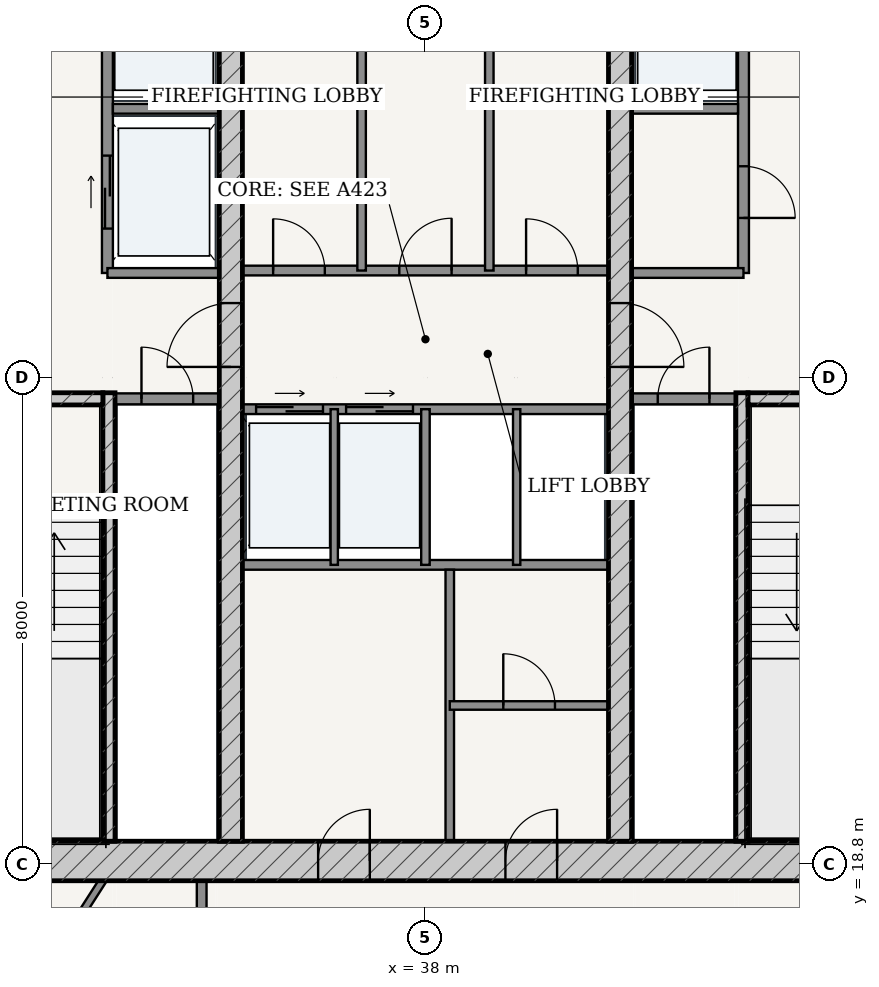
"""IFC4 building model, lengths in metres.
Left out: names, types, materials, properties, quantities, classifications, styles, units other than length and angle.
Written with IfcOpenShell. Run it as: python <this file> out.ifc"""

import sys

from ifc_helpers import new_model, si_unit, direction, frame, frame_2d, origin, place, context, subcontext, project, spatial, rectangle, extrude, source, transform, mapped, element, fill, save


model = new_model("IFC4")
c1 = context("Model", 3, precision=1e-05, world=origin(), true_north=direction((-0.2419218956, 0.970295726276)))
c2 = subcontext(c1, "Body", "Model", "MODEL_VIEW")
j1 = project(units=[si_unit("LENGTHUNIT", "METRE"), si_unit("PLANEANGLEUNIT", "RADIAN")], contexts=[c1])
p1 = place(None, origin())
s1 = spatial("IfcSite", under=j1, at=p1, CompositionType="ELEMENT")
p2 = place(p1, origin())
s2 = spatial("IfcBuilding", under=s1, at=p2, CompositionType="ELEMENT")
p3 = place(p2, frame((0.0, 0.0, 149.8)))
s3 = spatial("IfcBuildingStorey", under=s2, at=p3, CompositionType="ELEMENT", Elevation=149.8)
p4 = place(p3, frame((28.725, 18.85, 0.0), z_axis=(0.0, 0.0, 1.0), x_axis=(1.0, 0.0, 0.0)))
e1 = element("IfcWall", 1, at=p4, inside=s3, PredefinedType="SHEAR", context=c2, shape_type="SweptSolid", body=[
    extrude(rectangle(XDim=18.55, YDim=0.65, at=frame_2d((9.275, 0.0))), origin(), (0.0, 0.0, 1.0), 3.33),
])
p5 = place(p4, frame((7.51, 0.0, 0.0)))
e2 = element("IfcOpeningElement", 2, at=p5, cuts=e1, PredefinedType="OPENING", context=c2, shape_type="SweptSolid", body=[
    extrude(rectangle(XDim=0.85, YDim=2.1, at=frame_2d((0.425, 1.05))), frame((0.0, 0.335, 0.0), z_axis=(0.0, -1.0, 0.0), x_axis=(1.0, 0.0, 0.0)), (0.0, 0.0, 1.0), 0.67),
])
p6 = place(p4, frame((10.59, 0.0, 0.0)))
e3 = element("IfcOpeningElement", 3, at=p6, cuts=e1, PredefinedType="OPENING", context=c2, shape_type="SweptSolid", body=[
    extrude(rectangle(XDim=0.85, YDim=2.1, at=frame_2d((0.425, 1.05))), frame((0.0, 0.335, 0.0), z_axis=(0.0, -1.0, 0.0), x_axis=(1.0, 0.0, 0.0)), (0.0, 0.0, 1.0), 0.67),
])
p7 = place(p3, frame((32.795, 19.175, 0.0), z_axis=(0.0, 0.0, 1.0), x_axis=(0.0, 1.0, 0.0)))
e4 = element("IfcWall", 4, at=p7, inside=s3, PredefinedType="SOLIDWALL", context=c2, shape_type="SweptSolid", body=[
    extrude(rectangle(XDim=7.375, YDim=0.2, at=frame_2d((3.688, 0.0))), origin(), (0.0, 0.0, 1.0), 3.33),
])
p8 = place(p3, frame((29.375, 26.45, 0.0), z_axis=(0.0, 0.0, 1.0), x_axis=(1.0, 0.0, 0.0)))
e5 = element("IfcWall", 5, at=p8, inside=s3, PredefinedType="SOLIDWALL", context=c2, shape_type="SweptSolid", body=[
    extrude(rectangle(XDim=3.32, YDim=0.2, at=frame_2d((1.66, 0.0))), origin(), (0.0, 0.0, 1.0), 3.33),
])
p9 = place(p8, frame((1.185, 0.0, 0.0)))
e6 = element("IfcOpeningElement", 6, at=p9, cuts=e5, PredefinedType="OPENING", context=c2, shape_type="SweptSolid", body=[
    extrude(rectangle(XDim=0.95, YDim=2.15, at=frame_2d((0.475, 1.075))), frame((0.0, 0.11, 0.0), z_axis=(0.0, -1.0, 0.0), x_axis=(1.0, 0.0, 0.0)), (0.0, 0.0, 1.0), 0.22),
])
p10 = place(p3, frame((43.205, 19.175, 0.0), z_axis=(0.0, 0.0, 1.0), x_axis=(0.0, 1.0, 0.0)))
e7 = element("IfcWall", 7, at=p10, inside=s3, PredefinedType="SOLIDWALL", context=c2, shape_type="SweptSolid", body=[
    extrude(rectangle(XDim=7.375, YDim=0.2, at=frame_2d((3.688, 0.0))), origin(), (0.0, 0.0, 1.0), 3.33),
])
p11 = place(p3, frame((43.305, 26.45, 0.0), z_axis=(0.0, 0.0, 1.0), x_axis=(1.0, 0.0, 0.0)))
e8 = element("IfcWall", 8, at=p11, inside=s3, PredefinedType="SOLIDWALL", context=c2, shape_type="SweptSolid", body=[
    extrude(rectangle(XDim=3.32, YDim=0.2, at=frame_2d((1.66, 0.0))), origin(), (0.0, 0.0, 1.0), 3.33),
])
p12 = place(p11, frame((1.185, 0.0, 0.0)))
e9 = element("IfcOpeningElement", 9, at=p12, cuts=e8, PredefinedType="OPENING", context=c2, shape_type="SweptSolid", body=[
    extrude(rectangle(XDim=0.95, YDim=2.15, at=frame_2d((0.475, 1.075))), frame((0.0, 0.11, 0.0), z_axis=(0.0, -1.0, 0.0), x_axis=(1.0, 0.0, 0.0)), (0.0, 0.0, 1.0), 0.22),
])
p13 = place(p3, frame((34.8, 19.175, 0.0), z_axis=(0.0, 0.0, 1.0), x_axis=(0.0, 1.0, 0.0)))
e10 = element("IfcWall", 10, at=p13, inside=s3, PredefinedType="SHEAR", context=c2, shape_type="SweptSolid", body=[
    extrude(rectangle(XDim=15.25, YDim=0.38, at=frame_2d((7.625, 0.0))), origin(), (0.0, 0.0, 1.0), 3.33),
])
p14 = place(p13, frame((7.8, 0.0, 0.0)))
e11 = element("IfcOpeningElement", 11, at=p14, cuts=e10, PredefinedType="OPENING", context=c2, shape_type="SweptSolid", body=[
    extrude(rectangle(XDim=1.05, YDim=2.15, at=frame_2d((0.525, 1.075))), frame((0.0, 0.2, 0.0), z_axis=(0.0, -1.0, 0.0), x_axis=(1.0, 0.0, 0.0)), (0.0, 0.0, 1.0), 0.4),
])
p15 = place(p3, frame((41.2, 19.175, 0.0), z_axis=(0.0, 0.0, 1.0), x_axis=(0.0, 1.0, 0.0)))
e12 = element("IfcWall", 12, at=p15, inside=s3, PredefinedType="SHEAR", context=c2, shape_type="SweptSolid", body=[
    extrude(rectangle(XDim=15.25, YDim=0.38, at=frame_2d((7.625, 0.0))), origin(), (0.0, 0.0, 1.0), 3.33),
])
p16 = place(p15, frame((7.8, 0.0, 0.0)))
e13 = element("IfcOpeningElement", 13, at=p16, cuts=e12, PredefinedType="OPENING", context=c2, shape_type="SweptSolid", body=[
    extrude(rectangle(XDim=1.05, YDim=2.15, at=frame_2d((0.525, 1.075))), frame((0.0, 0.2, 0.0), z_axis=(0.0, -1.0, 0.0), x_axis=(1.0, 0.0, 0.0)), (0.0, 0.0, 1.0), 0.4),
])
p17 = place(p3, frame((32.9, 26.45, 0.0), z_axis=(0.0, 0.0, 1.0), x_axis=(1.0, 0.0, 0.0)))
e14 = element("IfcWall", 14, at=p17, inside=s3, PredefinedType="PARTITIONING", context=c2, shape_type="SweptSolid", body=[
    extrude(rectangle(XDim=1.71, YDim=0.18, at=frame_2d((0.855, 0.0))), origin(), (0.0, 0.0, 1.0), 3.33),
])
p18 = place(p17, frame((0.43, 0.0, 0.0)))
e15 = element("IfcOpeningElement", 15, at=p18, cuts=e14, PredefinedType="OPENING", context=c2, shape_type="SweptSolid", body=[
    extrude(rectangle(XDim=0.85, YDim=2.1, at=frame_2d((0.425, 1.05))), frame((0.0, 0.1, 0.0), z_axis=(0.0, -1.0, 0.0), x_axis=(1.0, 0.0, 0.0)), (0.0, 0.0, 1.0), 0.2),
])
p19 = place(p3, frame((41.39, 26.45, 0.0), z_axis=(0.0, 0.0, 1.0), x_axis=(1.0, 0.0, 0.0)))
e16 = element("IfcWall", 16, at=p19, inside=s3, PredefinedType="PARTITIONING", context=c2, shape_type="SweptSolid", body=[
    extrude(rectangle(XDim=1.71, YDim=0.18, at=frame_2d((0.855, 0.0))), origin(), (0.0, 0.0, 1.0), 3.33),
])
p20 = place(p19, frame((0.43, 0.0, 0.0)))
e17 = element("IfcOpeningElement", 17, at=p20, cuts=e16, PredefinedType="OPENING", context=c2, shape_type="SweptSolid", body=[
    extrude(rectangle(XDim=0.85, YDim=2.1, at=frame_2d((0.425, 1.05))), frame((0.0, 0.1, 0.0), z_axis=(0.0, -1.0, 0.0), x_axis=(1.0, 0.0, 0.0)), (0.0, 0.0, 1.0), 0.2),
])
p21 = place(p3, frame((32.77, 28.52, 0.0), z_axis=(0.0, 0.0, 1.0), x_axis=(0.0, 1.0, 0.0)))
e18 = element("IfcWall", 18, at=p21, inside=s3, PredefinedType="PARTITIONING", context=c2, shape_type="SweptSolid", body=[
    extrude(rectangle(XDim=5.905, YDim=0.18, at=frame_2d((2.953, 0.0))), origin(), (0.0, 0.0, 1.0), 3.33),
])
p22 = place(p21, frame((3.655, 0.0, 0.0)))
e19 = element("IfcOpeningElement", 19, at=p22, cuts=e18, PredefinedType="OPENING", context=c2, shape_type="SweptSolid", body=[
    extrude(rectangle(XDim=1.15, YDim=2.2, at=frame_2d((0.575, 1.1))), frame((0.0, 0.1, 0.0), z_axis=(0.0, -1.0, 0.0), x_axis=(1.0, 0.0, 0.0)), (0.0, 0.0, 1.0), 0.2),
])
p23 = place(p21, frame((0.73, 0.0, 0.0)))
e20 = element("IfcOpeningElement", 20, at=p23, cuts=e18, PredefinedType="OPENING", context=c2, shape_type="SweptSolid", body=[
    extrude(rectangle(XDim=1.2, YDim=2.25, at=frame_2d((0.6, 1.125))), frame((0.0, 0.1, 0.0), z_axis=(0.0, -1.0, 0.0), x_axis=(1.0, 0.0, 0.0)), (0.0, 0.0, 1.0), 0.2),
])
p24 = place(p3, frame((32.86, 31.22, 0.0), z_axis=(0.0, 0.0, 1.0), x_axis=(1.0, 0.0, 0.0)))
e21 = element("IfcWall", 21, at=p24, inside=s3, PredefinedType="PARTITIONING", context=c2, shape_type="SweptSolid", body=[
    extrude(rectangle(XDim=1.75, YDim=0.16, at=frame_2d((0.875, 0.0))), origin(), (0.0, 0.0, 1.0), 3.33),
])
p25 = place(p3, frame((32.77, 28.52, 0.0), z_axis=(0.0, 0.0, 1.0), x_axis=(1.0, 0.0, 0.0)))
e22 = element("IfcWall", 22, at=p25, inside=s3, PredefinedType="PARTITIONING", context=c2, shape_type="SweptSolid", body=[
    extrude(rectangle(XDim=1.84, YDim=0.16, at=frame_2d((0.92, 0.0))), origin(), (0.0, 0.0, 1.0), 3.33),
])
p26 = place(p3, frame((43.23, 28.52, 0.0), z_axis=(0.0, 0.0, 1.0), x_axis=(0.0, 1.0, 0.0)))
e23 = element("IfcWall", 23, at=p26, inside=s3, PredefinedType="PARTITIONING", context=c2, shape_type="SweptSolid", body=[
    extrude(rectangle(XDim=5.905, YDim=0.18, at=frame_2d((2.953, 0.0))), origin(), (0.0, 0.0, 1.0), 3.33),
])
p27 = place(p26, frame((0.905, 0.0, 0.0)))
e24 = element("IfcOpeningElement", 24, at=p27, cuts=e23, PredefinedType="OPENING", context=c2, shape_type="SweptSolid", body=[
    extrude(rectangle(XDim=0.85, YDim=2.1, at=frame_2d((0.425, 1.05))), frame((0.0, 0.1, 0.0), z_axis=(0.0, -1.0, 0.0), x_axis=(1.0, 0.0, 0.0)), (0.0, 0.0, 1.0), 0.2),
])
p28 = place(p26, frame((3.655, 0.0, 0.0)))
e25 = element("IfcOpeningElement", 25, at=p28, cuts=e23, PredefinedType="OPENING", context=c2, shape_type="SweptSolid", body=[
    extrude(rectangle(XDim=1.15, YDim=2.2, at=frame_2d((0.575, 1.1))), frame((0.0, 0.1, 0.0), z_axis=(0.0, -1.0, 0.0), x_axis=(1.0, 0.0, 0.0)), (0.0, 0.0, 1.0), 0.2),
])
p29 = place(p3, frame((41.39, 31.22, 0.0), z_axis=(0.0, 0.0, 1.0), x_axis=(1.0, 0.0, 0.0)))
e26 = element("IfcWall", 26, at=p29, inside=s3, PredefinedType="PARTITIONING", context=c2, shape_type="SweptSolid", body=[
    extrude(rectangle(XDim=1.75, YDim=0.16, at=frame_2d((0.875, 0.0))), origin(), (0.0, 0.0, 1.0), 3.33),
])
p30 = place(p3, frame((41.39, 28.52, 0.0), z_axis=(0.0, 0.0, 1.0), x_axis=(1.0, 0.0, 0.0)))
e27 = element("IfcWall", 27, at=p30, inside=s3, PredefinedType="PARTITIONING", context=c2, shape_type="SweptSolid", body=[
    extrude(rectangle(XDim=1.84, YDim=0.16, at=frame_2d((0.92, 0.0))), origin(), (0.0, 0.0, 1.0), 3.33),
])
p31 = place(p3, frame((34.99, 28.56, 0.0), z_axis=(0.0, 0.0, 1.0), x_axis=(1.0, 0.0, 0.0)))
e28 = element("IfcWall", 28, at=p31, inside=s3, PredefinedType="PARTITIONING", context=c2, shape_type="SweptSolid", body=[
    extrude(rectangle(XDim=6.02, YDim=0.16, at=frame_2d((3.01, 0.0))), origin(), (0.0, 0.0, 1.0), 3.33),
])
p32 = place(p31, frame((0.505, 0.0, 0.0)))
e29 = element("IfcOpeningElement", 29, at=p32, cuts=e28, PredefinedType="OPENING", context=c2, shape_type="SweptSolid", body=[
    extrude(rectangle(XDim=0.85, YDim=2.1, at=frame_2d((0.425, 1.05))), frame((0.0, 0.09, 0.0), z_axis=(0.0, -1.0, 0.0), x_axis=(1.0, 0.0, 0.0)), (0.0, 0.0, 1.0), 0.18),
])
p33 = place(p31, frame((2.58, 0.0, 0.0)))
e30 = element("IfcOpeningElement", 30, at=p33, cuts=e28, PredefinedType="OPENING", context=c2, shape_type="SweptSolid", body=[
    extrude(rectangle(XDim=0.86, YDim=2.1, at=frame_2d((0.43, 1.05))), frame((0.0, 0.09, 0.0), z_axis=(0.0, -1.0, 0.0), x_axis=(1.0, 0.0, 0.0)), (0.0, 0.0, 1.0), 0.18),
])
p34 = place(p31, frame((4.665, 0.0, 0.0)))
e31 = element("IfcOpeningElement", 31, at=p34, cuts=e28, PredefinedType="OPENING", context=c2, shape_type="SweptSolid", body=[
    extrude(rectangle(XDim=0.85, YDim=2.1, at=frame_2d((0.425, 1.05))), frame((0.0, 0.09, 0.0), z_axis=(0.0, -1.0, 0.0), x_axis=(1.0, 0.0, 0.0)), (0.0, 0.0, 1.0), 0.18),
])
for number, where, z_axis, x_axis in (
    (32, (36.95, 28.56, 0.0), (0.0, 0.0, 1.0), (0.0, 1.0, 0.0)),
    (33, (39.05, 28.56, 0.0), (0.0, 0.0, 1.0), (0.0, 1.0, 0.0)),
):
    element("IfcWall", number, at=place(p3, frame(where, z_axis=z_axis, x_axis=x_axis)), inside=s3, PredefinedType="PARTITIONING", context=c2, shape_type="SweptSolid", body=[
        extrude(rectangle(XDim=5.865, YDim=0.14, at=frame_2d((2.933, 0.0))), origin(), (0.0, 0.0, 1.0), 3.33),
    ])
p35 = place(p3, frame((34.99, 26.28, 0.0), z_axis=(0.0, 0.0, 1.0), x_axis=(1.0, 0.0, 0.0)))
e34 = element("IfcWall", 34, at=p35, inside=s3, PredefinedType="PARTITIONING", context=c2, shape_type="SweptSolid", body=[
    extrude(rectangle(XDim=6.02, YDim=0.16, at=frame_2d((3.01, 0.0))), origin(), (0.0, 0.0, 1.0), 3.33),
])
p36 = place(p35, frame((0.225, 0.0, 0.0)))
e35 = element("IfcOpeningElement", 35, at=p36, cuts=e34, PredefinedType="OPENING", context=c2, shape_type="SweptSolid", body=[
    extrude(rectangle(XDim=1.1, YDim=2.2, at=frame_2d((0.55, 1.1))), frame((0.0, 0.09, 0.0), z_axis=(0.0, -1.0, 0.0), x_axis=(1.0, 0.0, 0.0)), (0.0, 0.0, 1.0), 0.18),
])
p37 = place(p35, frame((1.705, 0.0, 0.0)))
e36 = element("IfcOpeningElement", 36, at=p37, cuts=e34, PredefinedType="OPENING", context=c2, shape_type="SweptSolid", body=[
    extrude(rectangle(XDim=1.1, YDim=2.2, at=frame_2d((0.55, 1.1))), frame((0.0, 0.09, 0.0), z_axis=(0.0, -1.0, 0.0), x_axis=(1.0, 0.0, 0.0)), (0.0, 0.0, 1.0), 0.18),
])
p38 = place(p3, frame((34.99, 23.72, 0.0), z_axis=(0.0, 0.0, 1.0), x_axis=(1.0, 0.0, 0.0)))
e37 = element("IfcWall", 37, at=p38, inside=s3, PredefinedType="PARTITIONING", context=c2, shape_type="SweptSolid", body=[
    extrude(rectangle(XDim=6.02, YDim=0.16, at=frame_2d((3.01, 0.0))), origin(), (0.0, 0.0, 1.0), 3.33),
])
p39 = place(p3, frame((36.5, 23.72, 0.0), z_axis=(0.0, 0.0, 1.0), x_axis=(0.0, 1.0, 0.0)))
e38 = element("IfcWall", 38, at=p39, inside=s3, PredefinedType="PARTITIONING", context=c2, shape_type="SweptSolid", body=[
    extrude(rectangle(XDim=2.56, YDim=0.12, at=frame_2d((1.28, 0.0))), origin(), (0.0, 0.0, 1.0), 3.33),
])
p40 = place(p3, frame((38.0, 23.72, 0.0), z_axis=(0.0, 0.0, 1.0), x_axis=(0.0, 1.0, 0.0)))
e39 = element("IfcWall", 39, at=p40, inside=s3, PredefinedType="PARTITIONING", context=c2, shape_type="SweptSolid", body=[
    extrude(rectangle(XDim=2.56, YDim=0.14, at=frame_2d((1.28, 0.0))), origin(), (0.0, 0.0, 1.0), 3.33),
])
p41 = place(p3, frame((39.5, 23.72, 0.0), z_axis=(0.0, 0.0, 1.0), x_axis=(0.0, 1.0, 0.0)))
e40 = element("IfcWall", 40, at=p41, inside=s3, PredefinedType="PARTITIONING", context=c2, shape_type="SweptSolid", body=[
    extrude(rectangle(XDim=2.56, YDim=0.12, at=frame_2d((1.28, 0.0))), origin(), (0.0, 0.0, 1.0), 3.33),
])
p42 = place(p3, frame((38.4, 19.175, 0.0), z_axis=(0.0, 0.0, 1.0), x_axis=(0.0, 1.0, 0.0)))
e41 = element("IfcWall", 41, at=p42, inside=s3, PredefinedType="PARTITIONING", context=c2, shape_type="SweptSolid", body=[
    extrude(rectangle(XDim=4.465, YDim=0.14, at=frame_2d((2.232, 0.0))), origin(), (0.0, 0.0, 1.0), 3.33),
])
p43 = place(p3, frame((38.4, 21.407, 0.0), z_axis=(0.0, 0.0, 1.0), x_axis=(1.0, 0.0, 0.0)))
e42 = element("IfcWall", 42, at=p43, inside=s3, PredefinedType="PARTITIONING", context=c2, shape_type="SweptSolid", body=[
    extrude(rectangle(XDim=2.61, YDim=0.14, at=frame_2d((1.305, 0.0))), origin(), (0.0, 0.0, 1.0), 3.33),
])
p44 = place(p43, frame((0.88, 0.0, 0.0)))
e43 = element("IfcOpeningElement", 43, at=p44, cuts=e42, PredefinedType="OPENING", context=c2, shape_type="SweptSolid", body=[
    extrude(rectangle(XDim=0.85, YDim=2.1, at=frame_2d((0.425, 1.05))), frame((0.0, 0.08, 0.0), z_axis=(0.0, -1.0, 0.0), x_axis=(1.0, 0.0, 0.0)), (0.0, 0.0, 1.0), 0.16),
])
p45 = place(p3, frame((34.32, 16.675, 0.0), z_axis=(0.0, 0.0, 1.0), x_axis=(0.0, 1.0, 0.0)))
e44 = element("IfcWall", 44, at=p45, inside=s3, PredefinedType="PARTITIONING", context=c2, shape_type="SweptSolid", body=[
    extrude(rectangle(XDim=1.85, YDim=0.16, at=frame_2d((0.925, 0.0))), origin(), (0.0, 0.0, 1.0), 3.33),
])
p46 = place(p3, frame((32.691, 18.525, 0.0), z_axis=(0.0, 0.0, 1.0), x_axis=(-0.54002976428, -0.841645919429, 0.0)))
e45 = element("IfcWall", 45, at=p46, inside=s3, PredefinedType="PARTITIONING", context=c2, shape_type="SweptSolid", body=[
    extrude(rectangle(XDim=3.086, YDim=0.12, at=frame_2d((1.543, 0.0))), origin(), (0.0, 0.0, 1.0), 3.33),
])
m1 = source(origin(), c2, "Body", "SweptSolid", [
    extrude(rectangle(XDim=1.05, YDim=2.15, at=frame_2d((0.525, 1.075))), frame((0.0, 0.025, 0.0), z_axis=(0.0, -1.0, 0.0), x_axis=(1.0, 0.0, 0.0)), (0.0, 0.0, 1.0), 0.05),
])
p47 = place(p14, origin())
e46 = element("IfcDoor", 46, at=p47, inside=s3, OperationType="SINGLE_SWING_LEFT", PredefinedType="DOOR", context=c2, shape_type="MappedRepresentation", body=[
    mapped(m1, transform((0.0, 0.0, 0.0), scale=1.0)),
])
fill(e11, e46)
p48 = place(p16, frame((1.05, 0.0, 0.0), z_axis=(0.0, 0.0, 1.0), x_axis=(-1.0, 0.0, 0.0)))
e47 = element("IfcDoor", 47, at=p48, inside=s3, OperationType="SINGLE_SWING_RIGHT", PredefinedType="DOOR", context=c2, shape_type="MappedRepresentation", body=[
    mapped(m1, transform((0.0, 0.0, 0.0), scale=1.0)),
])
fill(e13, e47)
m2 = source(origin(), c2, "Body", "SweptSolid", [
    extrude(rectangle(XDim=0.85, YDim=2.1, at=frame_2d((0.425, 1.05))), frame((0.0, 0.025, 0.0), z_axis=(0.0, -1.0, 0.0), x_axis=(1.0, 0.0, 0.0)), (0.0, 0.0, 1.0), 0.05),
])
p49 = place(p18, origin())
e48 = element("IfcDoor", 48, at=p49, inside=s3, OperationType="SINGLE_SWING_LEFT", PredefinedType="DOOR", context=c2, shape_type="MappedRepresentation", body=[
    mapped(m2, transform((0.0, 0.0, 0.0), scale=1.0)),
])
fill(e15, e48)
p50 = place(p20, origin())
e49 = element("IfcDoor", 49, at=p50, inside=s3, OperationType="SINGLE_SWING_RIGHT", PredefinedType="DOOR", context=c2, shape_type="MappedRepresentation", body=[
    mapped(m2, transform((0.0, 0.0, 0.0), scale=1.0)),
])
fill(e17, e49)
p51 = place(p27, frame((0.85, 0.0, 0.0), z_axis=(0.0, 0.0, 1.0), x_axis=(-1.0, 0.0, 0.0)))
e50 = element("IfcDoor", 50, at=p51, inside=s3, OperationType="SINGLE_SWING_RIGHT", PredefinedType="DOOR", context=c2, shape_type="MappedRepresentation", body=[
    mapped(m2, transform((0.0, 0.0, 0.0), scale=1.0)),
])
fill(e24, e50)
p52 = place(p32, origin())
e51 = element("IfcDoor", 51, at=p52, inside=s3, OperationType="SINGLE_SWING_LEFT", PredefinedType="DOOR", context=c2, shape_type="MappedRepresentation", body=[
    mapped(m2, transform((0.0, 0.0, 0.0), scale=1.0)),
])
fill(e29, e51)
m3 = source(origin(), c2, "Body", "SweptSolid", [
    extrude(rectangle(XDim=0.86, YDim=2.1, at=frame_2d((0.43, 1.05))), frame((0.0, 0.025, 0.0), z_axis=(0.0, -1.0, 0.0), x_axis=(1.0, 0.0, 0.0)), (0.0, 0.0, 1.0), 0.05),
])
p53 = place(p33, origin())
e52 = element("IfcDoor", 52, at=p53, inside=s3, OperationType="SINGLE_SWING_RIGHT", PredefinedType="DOOR", context=c2, shape_type="MappedRepresentation", body=[
    mapped(m3, transform((0.0, 0.0, 0.0), scale=1.0)),
])
fill(e30, e52)
p54 = place(p34, origin())
e53 = element("IfcDoor", 53, at=p54, inside=s3, OperationType="SINGLE_SWING_LEFT", PredefinedType="DOOR", context=c2, shape_type="MappedRepresentation", body=[
    mapped(m2, transform((0.0, 0.0, 0.0), scale=1.0)),
])
fill(e31, e53)
p55 = place(p5, origin())
e54 = element("IfcDoor", 54, at=p55, inside=s3, OperationType="SINGLE_SWING_RIGHT", PredefinedType="DOOR", context=c2, shape_type="MappedRepresentation", body=[
    mapped(m2, transform((0.0, 0.0, 0.0), scale=1.0)),
])
fill(e2, e54)
p56 = place(p6, origin())
e55 = element("IfcDoor", 55, at=p56, inside=s3, OperationType="SINGLE_SWING_RIGHT", PredefinedType="DOOR", context=c2, shape_type="MappedRepresentation", body=[
    mapped(m2, transform((0.0, 0.0, 0.0), scale=1.0)),
])
fill(e3, e55)
p57 = place(p44, origin())
e56 = element("IfcDoor", 56, at=p57, inside=s3, OperationType="SINGLE_SWING_LEFT", PredefinedType="DOOR", context=c2, shape_type="MappedRepresentation", body=[
    mapped(m2, transform((0.0, 0.0, 0.0), scale=1.0)),
])
fill(e43, e56)
m4 = source(origin(), c2, "Body", "SweptSolid", [
    extrude(rectangle(XDim=1.2, YDim=2.25, at=frame_2d((0.6, 1.125))), frame((0.0, 0.025, 0.0), z_axis=(0.0, -1.0, 0.0), x_axis=(1.0, 0.0, 0.0)), (0.0, 0.0, 1.0), 0.05),
])
p58 = place(p23, origin())
e57 = element("IfcDoor", 57, at=p58, inside=s3, OperationType="DOUBLE_DOOR_SLIDING", PredefinedType="DOOR", context=c2, shape_type="MappedRepresentation", body=[
    mapped(m4, transform((0.0, 0.0, 0.0), scale=1.0)),
])
fill(e20, e57)
m5 = source(origin(), c2, "Body", "SweptSolid", [
    extrude(rectangle(XDim=1.1, YDim=2.2, at=frame_2d((0.55, 1.1))), frame((0.0, 0.025, 0.0), z_axis=(0.0, -1.0, 0.0), x_axis=(1.0, 0.0, 0.0)), (0.0, 0.0, 1.0), 0.05),
])
p59 = place(p36, origin())
e58 = element("IfcDoor", 58, at=p59, inside=s3, OperationType="DOUBLE_DOOR_SLIDING", PredefinedType="DOOR", context=c2, shape_type="MappedRepresentation", body=[
    mapped(m5, transform((0.0, 0.0, 0.0), scale=1.0)),
])
fill(e35, e58)
p60 = place(p37, origin())
e59 = element("IfcDoor", 59, at=p60, inside=s3, OperationType="DOUBLE_DOOR_SLIDING", PredefinedType="DOOR", context=c2, shape_type="MappedRepresentation", body=[
    mapped(m5, transform((0.0, 0.0, 0.0), scale=1.0)),
])
fill(e36, e59)
save(model, sys.argv[1])
